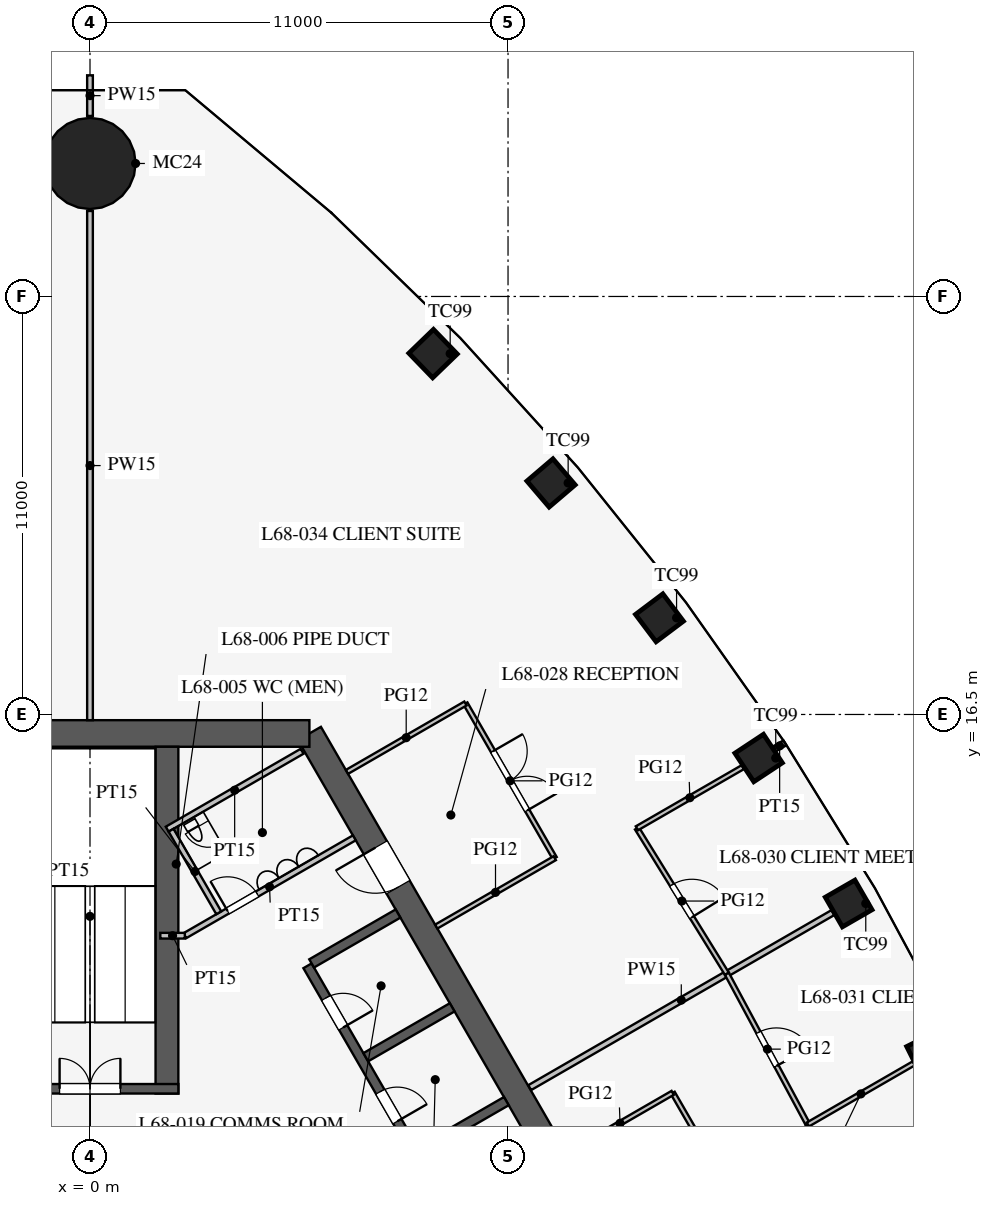
"""IFC4 building model, lengths in metres.
Left out: names, types, materials, properties, quantities, classifications, styles, units other than length and angle.
Written with IfcOpenShell. Run it as: python <this file> out.ifc"""

import sys

from ifc_helpers import new_model, si_unit, direction, frame, frame_2d, origin, origin_2d, place, context, subcontext, project, spatial, rectangle, circle, extrude, element, fill, save


model = new_model("IFC4")
c1 = context("Model", 3, precision=1e-05, world=origin(), true_north=direction((0.0, 1.0)))
c2 = subcontext(c1, "Body", "Model", "MODEL_VIEW")
j1 = project(units=[si_unit("LENGTHUNIT", "METRE"), si_unit("PLANEANGLEUNIT", "RADIAN")], contexts=[c1])
p1 = place(None, origin())
s1 = spatial("IfcSite", under=j1, at=p1, CompositionType="ELEMENT")
p2 = place(p1, origin())
s2 = spatial("IfcBuilding", under=s1, at=p2, CompositionType="ELEMENT")
p3 = place(p2, frame((0.0, 0.0, 297.3)))
s3 = spatial("IfcBuildingStorey", under=s2, at=p3, CompositionType="ELEMENT", Elevation=297.3)
for number, where, z_axis, x_axis in (
    (1, (22.094, 7.56, 0.0), (0.0, 0.0, 1.0), (-0.447, 0.895, 0.0)),
    (2, (19.963, 11.526, 0.0), (0.0, 0.0, 1.0), (-0.5, 0.866, 0.0)),
    (3, (17.594, 15.354, 0.0), (0.0, 0.0, 1.0), (-0.552, 0.834, 0.0)),
    (4, (14.985, 19.044, 0.0), (0.0, 0.0, 1.0), (-0.601, 0.799, 0.0)),
    (5, (12.132, 22.593, 0.0), (0.0, 0.0, 1.0), (-0.649, 0.761, 0.0)),
    (6, (9.027, 25.997, 0.0), (0.0, 0.0, 1.0), (-0.695, 0.719, 0.0)),
):
    element("IfcColumn", number, at=place(p3, frame(where, z_axis=z_axis, x_axis=x_axis)), inside=s3, PredefinedType="COLUMN", context=c2, shape_type="SweptSolid", body=[
        extrude(rectangle(XDim=0.9, YDim=0.9, at=origin_2d()), origin(), (0.0, 0.0, 1.0), 4.2),
    ])
p4 = place(p3, frame((0.0, 31.0, 0.0), z_axis=(0.0, 0.0, 1.0), x_axis=(1.0, 0.0, 0.0)))
e7 = element("IfcColumn", 7, at=p4, inside=s3, PredefinedType="COLUMN", context=c2, shape_type="SweptSolid", body=[
    extrude(circle(Radius=1.2, at=origin_2d()), origin(), (0.0, 0.0, 1.0), 4.2),
])
p5 = place(p3, frame((16.743, -3.0, 0.0), z_axis=(0.0, 0.0, 1.0), x_axis=(-0.500002442456, 0.866023993627, 0.0)))
e8 = element("IfcWall", 8, at=p5, inside=s3, PredefinedType="SHEAR", context=c2, shape_type="SweptSolid", body=[
    extrude(rectangle(XDim=21.939, YDim=0.7, at=frame_2d((10.97, 0.0))), origin(), (0.0, 0.0, 1.0), 4.2),
])
p6 = place(p5, frame((17.27, 0.0, 0.0)))
e9 = element("IfcOpeningElement", 9, at=p6, cuts=e8, PredefinedType="OPENING", context=c2, shape_type="SweptSolid", body=[
    extrude(rectangle(XDim=1.2, YDim=2.1, at=frame_2d((0.6, 1.05))), frame((0.0, 0.36, 0.0), z_axis=(0.0, -1.0, 0.0), x_axis=(1.0, 0.0, 0.0)), (0.0, 0.0, 1.0), 0.72),
])
p7 = place(p5, frame((3.47, 0.0, 0.0)))
e10 = element("IfcOpeningElement", 10, at=p7, cuts=e8, PredefinedType="OPENING", context=c2, shape_type="SweptSolid", body=[
    extrude(rectangle(XDim=1.2, YDim=2.1, at=frame_2d((0.6, 1.05))), frame((0.0, 0.36, 0.0), z_axis=(0.0, -1.0, 0.0), x_axis=(1.0, 0.0, 0.0)), (0.0, 0.0, 1.0), 0.72),
])
p8 = place(p3, frame((5.773, 16.0, 0.0), z_axis=(0.0, 0.0, 1.0), x_axis=(-1.0, 0.0, 0.0)))
e11 = element("IfcWall", 11, at=p8, inside=s3, PredefinedType="SHEAR", context=c2, shape_type="SweptSolid", body=[
    extrude(rectangle(XDim=11.547, YDim=0.7, at=frame_2d((5.773, 0.0))), origin(), (0.0, 0.0, 1.0), 4.2),
])
p9 = place(p3, frame((11.424, 0.014, 0.0), z_axis=(0.0, 0.0, 1.0), x_axis=(-0.500001763848, 0.866024385424, 0.0)))
e12 = element("IfcWall", 12, at=p9, inside=s3, PredefinedType="SHEAR", context=c2, shape_type="SweptSolid", body=[
    extrude(rectangle(XDim=11.4, YDim=0.25, at=frame_2d((5.7, 0.0))), origin(), (0.0, 0.0, 1.0), 4.2),
])
p10 = place(p9, frame((0.975, 0.0, 0.0)))
e13 = element("IfcOpeningElement", 13, at=p10, cuts=e12, PredefinedType="OPENING", context=c2, shape_type="SweptSolid", body=[
    extrude(rectangle(XDim=0.9, YDim=2.1, at=frame_2d((0.45, 1.05))), frame((0.0, 0.135, 0.0), z_axis=(0.0, -1.0, 0.0), x_axis=(1.0, 0.0, 0.0)), (0.0, 0.0, 1.0), 0.27),
])
p11 = place(p9, frame((3.825, 0.0, 0.0)))
e14 = element("IfcOpeningElement", 14, at=p11, cuts=e12, PredefinedType="OPENING", context=c2, shape_type="SweptSolid", body=[
    extrude(rectangle(XDim=0.9, YDim=2.1, at=frame_2d((0.45, 1.05))), frame((0.0, 0.135, 0.0), z_axis=(0.0, -1.0, 0.0), x_axis=(1.0, 0.0, 0.0)), (0.0, 0.0, 1.0), 0.27),
])
p12 = place(p9, frame((6.675, 0.0, 0.0)))
e15 = element("IfcOpeningElement", 15, at=p12, cuts=e12, PredefinedType="OPENING", context=c2, shape_type="SweptSolid", body=[
    extrude(rectangle(XDim=0.9, YDim=2.1, at=frame_2d((0.45, 1.05))), frame((0.0, 0.135, 0.0), z_axis=(0.0, -1.0, 0.0), x_axis=(1.0, 0.0, 0.0)), (0.0, 0.0, 1.0), 0.27),
])
p13 = place(p9, frame((9.525, 0.0, 0.0)))
e16 = element("IfcOpeningElement", 16, at=p13, cuts=e12, PredefinedType="OPENING", context=c2, shape_type="SweptSolid", body=[
    extrude(rectangle(XDim=0.9, YDim=2.1, at=frame_2d((0.45, 1.05))), frame((0.0, 0.135, 0.0), z_axis=(0.0, -1.0, 0.0), x_axis=(1.0, 0.0, 0.0)), (0.0, 0.0, 1.0), 0.27),
])
for number, where, z_axis, x_axis in (
    (17, (8.682, 5.012, 0.0), (0.0, 0.0, 1.0), (0.866, 0.5, 0.0)),
    (18, (7.257, 7.481, 0.0), (0.0, 0.0, 1.0), (0.866, 0.5, 0.0)),
    (19, (5.832, 9.949, 0.0), (0.0, 0.0, 1.0), (0.866, 0.5, 0.0)),
):
    element("IfcWall", number, at=place(p3, frame(where, z_axis=z_axis, x_axis=x_axis)), inside=s3, PredefinedType="SHEAR", context=c2, shape_type="SweptSolid", body=[
        extrude(rectangle(XDim=2.625, YDim=0.25, at=frame_2d((1.312, 0.0))), origin(), (0.0, 0.0, 1.0), 4.2),
    ])
p14 = place(p3, frame((2.025, 6.525, 0.0), z_axis=(0.0, 0.0, 1.0), x_axis=(0.0, 1.0, 0.0)))
e20 = element("IfcWall", 20, at=p14, inside=s3, PredefinedType="SHEAR", context=c2, shape_type="SweptSolid", body=[
    extrude(rectangle(XDim=9.125, YDim=0.6, at=frame_2d((4.562, 0.0))), origin(), (0.0, 0.0, 1.0), 4.2),
])
p15 = place(p3, frame((2.325, 6.65, 0.0), z_axis=(0.0, 0.0, 1.0), x_axis=(-1.0, 0.0, 0.0)))
e21 = element("IfcWall", 21, at=p15, inside=s3, PredefinedType="SHEAR", context=c2, shape_type="SweptSolid", body=[
    extrude(rectangle(XDim=4.65, YDim=0.25, at=frame_2d((2.325, 0.0))), origin(), (0.0, 0.0, 1.0), 4.2),
])
p16 = place(p15, frame((1.525, 0.0, 0.0)))
e22 = element("IfcOpeningElement", 22, at=p16, cuts=e21, PredefinedType="OPENING", context=c2, shape_type="SweptSolid", body=[
    extrude(rectangle(XDim=1.6, YDim=2.1, at=frame_2d((0.8, 1.05))), frame((0.0, 0.135, 0.0), z_axis=(0.0, -1.0, 0.0), x_axis=(1.0, 0.0, 0.0)), (0.0, 0.0, 1.0), 0.27),
])
p17 = place(p3, frame((2.495, 10.678, 0.0), z_axis=(0.0, 0.0, 1.0), x_axis=(0.866037967349, 0.499978238636, 0.0)))
e23 = element("IfcWall", 23, at=p17, inside=s3, PredefinedType="PARTITIONING", context=c2, shape_type="SweptSolid", body=[
    extrude(rectangle(XDim=5.15, YDim=0.15, at=frame_2d((2.575, 0.0))), origin(), (0.0, 0.0, 1.0), 4.0),
])
p18 = place(p17, frame((1.3, 0.0, 0.0)))
e24 = element("IfcOpeningElement", 24, at=p18, cuts=e23, PredefinedType="OPENING", context=c2, shape_type="SweptSolid", body=[
    extrude(rectangle(XDim=0.9, YDim=2.1, at=frame_2d((0.45, 1.05))), frame((0.0, 0.085, 0.0), z_axis=(0.0, -1.0, 0.0), x_axis=(1.0, 0.0, 0.0)), (0.0, 0.0, 1.0), 0.17),
])
p19 = place(p3, frame((2.495, 10.678, 0.0), z_axis=(0.0, 0.0, 1.0), x_axis=(-1.0, 0.0, 0.0)))
e25 = element("IfcWall", 25, at=p19, inside=s3, PredefinedType="PARTITIONING", context=c2, shape_type="SweptSolid", body=[
    extrude(rectangle(XDim=0.645, YDim=0.15, at=frame_2d((0.323, 0.0))), origin(), (0.0, 0.0, 1.0), 4.0),
])
p20 = place(p3, frame((2.031, 13.482, 0.0), z_axis=(0.0, 0.0, 1.0), x_axis=(0.866050731258, 0.499956128963, 0.0)))
e26 = element("IfcWall", 26, at=p20, inside=s3, PredefinedType="PARTITIONING", context=c2, shape_type="SweptSolid", body=[
    extrude(rectangle(XDim=4.1, YDim=0.15, at=frame_2d((2.05, 0.0))), origin(), (0.0, 0.0, 1.0), 4.0),
])
p21 = place(p3, frame((3.389, 11.281, 0.0), z_axis=(0.0, 0.0, 1.0), x_axis=(-0.499989096993, 0.866031698547, 0.0)))
e27 = element("IfcWall", 27, at=p21, inside=s3, PredefinedType="PARTITIONING", context=c2, shape_type="SweptSolid", body=[
    extrude(rectangle(XDim=2.51, YDim=0.15, at=frame_2d((1.255, 0.0))), origin(), (0.0, 0.0, 1.0), 4.0),
])
p22 = place(p3, frame((0.0, 16.35, 0.0), z_axis=(0.0, 0.0, 1.0), x_axis=(0.0, 1.0, 0.0)))
e28 = element("IfcWall", 28, at=p22, inside=s3, PredefinedType="PARTITIONING", context=c2, shape_type="SweptSolid", body=[
    extrude(rectangle(XDim=13.4, YDim=0.15, at=frame_2d((6.7, 0.0))), origin(), (0.0, 0.0, 1.0), 2.5),
])
p23 = place(p3, frame((0.0, 32.25, 0.0), z_axis=(0.0, 0.0, 1.0), x_axis=(0.0, 1.0, 0.0)))
e29 = element("IfcWall", 29, at=p23, inside=s3, PredefinedType="PARTITIONING", context=c2, shape_type="SweptSolid", body=[
    extrude(rectangle(XDim=1.07, YDim=0.15, at=frame_2d((0.535, 0.0))), origin(), (0.0, 0.0, 1.0), 2.5),
])
p24 = place(p3, frame((11.57, 6.68, 0.0), z_axis=(0.0, 0.0, 1.0), x_axis=(0.866019635725, 0.500009990439, 0.0)))
e30 = element("IfcWall", 30, at=p24, inside=s3, PredefinedType="PARTITIONING", context=c2, shape_type="SweptSolid", body=[
    extrude(rectangle(XDim=9.212, YDim=0.15, at=frame_2d((4.606, 0.0))), origin(), (0.0, 0.0, 1.0), 3.3),
])
p25 = place(p3, frame((12.229, 12.719, 0.0), z_axis=(0.0, 0.0, 1.0), x_axis=(-0.500016218704, 0.866016039709, 0.0)))
e31 = element("IfcWall", 31, at=p25, inside=s3, PredefinedType="PARTITIONING", context=c2, shape_type="SweptSolid", body=[
    extrude(rectangle(XDim=4.7, YDim=0.12, at=frame_2d((2.35, 0.0))), origin(), (0.0, 0.0, 1.0), 2.9),
])
p26 = place(p25, frame((1.45, 0.0, 0.15)))
e32 = element("IfcOpeningElement", 32, at=p26, cuts=e31, PredefinedType="OPENING", context=c2, shape_type="SweptSolid", body=[
    extrude(rectangle(XDim=1.8, YDim=2.1, at=frame_2d((0.9, 1.05))), frame((0.0, 0.07, 0.0), z_axis=(0.0, -1.0, 0.0), x_axis=(1.0, 0.0, 0.0)), (0.0, 0.0, 1.0), 0.14),
])
p27 = place(p3, frame((17.133, 3.425, 0.0), z_axis=(0.0, 0.0, 1.0), x_axis=(-0.500012057535, 0.866018442252, 0.0)))
e33 = element("IfcWall", 33, at=p27, inside=s3, PredefinedType="PARTITIONING", context=c2, shape_type="SweptSolid", body=[
    extrude(rectangle(XDim=3.6, YDim=0.12, at=frame_2d((1.8, 0.0))), origin(), (0.0, 0.0, 1.0), 2.9),
])
p28 = place(p27, frame((1.3, 0.0, 0.15)))
e34 = element("IfcOpeningElement", 34, at=p28, cuts=e33, PredefinedType="OPENING", context=c2, shape_type="SweptSolid", body=[
    extrude(rectangle(XDim=1.0, YDim=2.1, at=frame_2d((0.5, 1.05))), frame((0.0, 0.07, 0.0), z_axis=(0.0, -1.0, 0.0), x_axis=(1.0, 0.0, 0.0)), (0.0, 0.0, 1.0), 0.14),
])
p29 = place(p3, frame((9.111, 10.918, 0.0), z_axis=(0.0, 0.0, 1.0), x_axis=(0.866035395735, 0.499982693035, 0.0)))
e35 = element("IfcWall", 35, at=p29, inside=s3, PredefinedType="PARTITIONING", context=c2, shape_type="SweptSolid", body=[
    extrude(rectangle(XDim=3.6, YDim=0.12, at=frame_2d((1.8, 0.0))), origin(), (0.0, 0.0, 1.0), 2.9),
])
p30 = place(p3, frame((6.761, 14.989, 0.0), z_axis=(0.0, 0.0, 1.0), x_axis=(0.866018442252, 0.500012057535, 0.0)))
e36 = element("IfcWall", 36, at=p30, inside=s3, PredefinedType="PARTITIONING", context=c2, shape_type="SweptSolid", body=[
    extrude(rectangle(XDim=3.6, YDim=0.12, at=frame_2d((1.8, 0.0))), origin(), (0.0, 0.0, 1.0), 2.9),
])
p31 = place(p3, frame((12.562, 4.943, 0.0), z_axis=(0.0, 0.0, 1.0), x_axis=(0.866008981251, 0.500028443584, 0.0)))
e37 = element("IfcWall", 37, at=p31, inside=s3, PredefinedType="PARTITIONING", context=c2, shape_type="SweptSolid", body=[
    extrude(rectangle(XDim=3.2, YDim=0.12, at=frame_2d((1.6, 0.0))), origin(), (0.0, 0.0, 1.0), 2.9),
])
p32 = place(p3, frame((18.01, 15.594, 0.0), z_axis=(0.0, 0.0, 1.0), x_axis=(0.866095534226, 0.499878510834, 0.0)))
e38 = element("IfcWall", 38, at=p32, inside=s3, PredefinedType="PARTITIONING", context=c2, shape_type="SweptSolid", body=[
    extrude(rectangle(XDim=0.316, YDim=0.15, at=frame_2d((0.158, 0.0))), origin(), (0.0, 0.0, 1.0), 2.9),
])
p33 = place(p3, frame((16.759, 9.676, 0.0), z_axis=(0.0, 0.0, 1.0), x_axis=(-0.525996140194, 0.850486954927, 0.0)))
e39 = element("IfcWall", 39, at=p33, inside=s3, PredefinedType="PARTITIONING", context=c2, shape_type="SweptSolid", body=[
    extrude(rectangle(XDim=4.502, YDim=0.12, at=frame_2d((2.251, 0.0))), origin(), (0.0, 0.0, 1.0), 2.9),
])
p34 = place(p33, frame((1.75, 0.0, 0.15)))
e40 = element("IfcOpeningElement", 40, at=p34, cuts=e39, PredefinedType="OPENING", context=c2, shape_type="SweptSolid", body=[
    extrude(rectangle(XDim=1.0, YDim=2.1, at=frame_2d((0.5, 1.05))), frame((0.0, 0.07, 0.0), z_axis=(0.0, -1.0, 0.0), x_axis=(1.0, 0.0, 0.0)), (0.0, 0.0, 1.0), 0.14),
])
p35 = place(p3, frame((18.891, 5.71, 0.0), z_axis=(0.0, 0.0, 1.0), x_axis=(-0.473524102582, 0.880780860529, 0.0)))
e41 = element("IfcWall", 41, at=p35, inside=s3, PredefinedType="PARTITIONING", context=c2, shape_type="SweptSolid", body=[
    extrude(rectangle(XDim=4.502, YDim=0.12, at=frame_2d((2.251, 0.0))), origin(), (0.0, 0.0, 1.0), 2.9),
])
p36 = place(p35, frame((1.75, 0.0, 0.15)))
e42 = element("IfcOpeningElement", 42, at=p36, cuts=e41, PredefinedType="OPENING", context=c2, shape_type="SweptSolid", body=[
    extrude(rectangle(XDim=1.0, YDim=2.1, at=frame_2d((0.5, 1.05))), frame((0.0, 0.07, 0.0), z_axis=(0.0, -1.0, 0.0), x_axis=(1.0, 0.0, 0.0)), (0.0, 0.0, 1.0), 0.14),
])
p37 = place(p3, frame((20.786, 1.608, 0.0), z_axis=(0.0, 0.0, 1.0), x_axis=(-0.419335693458, 0.907831248742, 0.0)))
e43 = element("IfcWall", 43, at=p37, inside=s3, PredefinedType="PARTITIONING", context=c2, shape_type="SweptSolid", body=[
    extrude(rectangle(XDim=4.519, YDim=0.12, at=frame_2d((2.259, 0.0))), origin(), (0.0, 0.0, 1.0), 2.9),
])
p38 = place(p37, frame((1.75, 0.0, 0.15)))
e44 = element("IfcOpeningElement", 44, at=p38, cuts=e43, PredefinedType="OPENING", context=c2, shape_type="SweptSolid", body=[
    extrude(rectangle(XDim=1.0, YDim=2.1, at=frame_2d((0.5, 1.05))), frame((0.0, 0.07, 0.0), z_axis=(0.0, -1.0, 0.0), x_axis=(1.0, 0.0, 0.0)), (0.0, 0.0, 1.0), 0.14),
])
p39 = place(p3, frame((14.391, 13.505, 0.0), z_axis=(0.0, 0.0, 1.0), x_axis=(0.866054182849, 0.499950149885, 0.0)))
e45 = element("IfcWall", 45, at=p39, inside=s3, PredefinedType="PARTITIONING", context=c2, shape_type="SweptSolid", body=[
    extrude(rectangle(XDim=3.218, YDim=0.12, at=frame_2d((1.609, 0.0))), origin(), (0.0, 0.0, 1.0), 2.9),
])
p40 = place(p3, frame((18.891, 5.71, 0.0), z_axis=(0.0, 0.0, 1.0), x_axis=(0.866021328928, 0.500007057792, 0.0)))
e46 = element("IfcWall", 46, at=p40, inside=s3, PredefinedType="PARTITIONING", context=c2, shape_type="SweptSolid", body=[
    extrude(rectangle(XDim=3.218, YDim=0.12, at=frame_2d((1.609, 0.0))), origin(), (0.0, 0.0, 1.0), 2.9),
])
p41 = place(p18, origin())
e47 = element("IfcDoor", 47, at=p41, inside=s3, OperationType="SINGLE_SWING_LEFT", PredefinedType="DOOR", context=c2, shape_type="SweptSolid", body=[
    extrude(rectangle(XDim=0.9, YDim=2.1, at=frame_2d((0.45, 1.05))), frame((0.0, 0.025, 0.0), z_axis=(0.0, -1.0, 0.0), x_axis=(1.0, 0.0, 0.0)), (0.0, 0.0, 1.0), 0.05),
])
fill(e24, e47)
p42 = place(p16, frame((1.6, 0.0, 0.0), z_axis=(0.0, 0.0, 1.0), x_axis=(-1.0, 0.0, 0.0)))
e48 = element("IfcDoor", 48, at=p42, inside=s3, OperationType="DOUBLE_DOOR_SINGLE_SWING", PredefinedType="DOOR", context=c2, shape_type="SweptSolid", body=[
    extrude(rectangle(XDim=1.6, YDim=2.1, at=frame_2d((0.8, 1.05))), frame((0.0, 0.025, 0.0), z_axis=(0.0, -1.0, 0.0), x_axis=(1.0, 0.0, 0.0)), (0.0, 0.0, 1.0), 0.05),
])
fill(e22, e48)
p43 = place(p6, origin())
e49 = element("IfcDoor", 49, at=p43, inside=s3, OperationType="SINGLE_SWING_RIGHT", PredefinedType="DOOR", context=c2, shape_type="SweptSolid", body=[
    extrude(rectangle(XDim=1.2, YDim=2.1, at=frame_2d((0.6, 1.05))), frame((0.0, 0.025, 0.0), z_axis=(0.0, -1.0, 0.0), x_axis=(1.0, 0.0, 0.0)), (0.0, 0.0, 1.0), 0.05),
])
fill(e9, e49)
p44 = place(p12, frame((0.9, 0.0, 0.0), z_axis=(0.0, 0.0, 1.0), x_axis=(-1.0, 0.0, 0.0)))
e50 = element("IfcDoor", 50, at=p44, inside=s3, OperationType="SINGLE_SWING_RIGHT", PredefinedType="DOOR", context=c2, shape_type="SweptSolid", body=[
    extrude(rectangle(XDim=0.9, YDim=2.1, at=frame_2d((0.45, 1.05))), frame((0.0, 0.025, 0.0), z_axis=(0.0, -1.0, 0.0), x_axis=(1.0, 0.0, 0.0)), (0.0, 0.0, 1.0), 0.05),
])
fill(e15, e50)
p45 = place(p13, frame((0.9, 0.0, 0.0), z_axis=(0.0, 0.0, 1.0), x_axis=(-1.0, 0.0, 0.0)))
e51 = element("IfcDoor", 51, at=p45, inside=s3, OperationType="SINGLE_SWING_RIGHT", PredefinedType="DOOR", context=c2, shape_type="SweptSolid", body=[
    extrude(rectangle(XDim=0.9, YDim=2.1, at=frame_2d((0.45, 1.05))), frame((0.0, 0.025, 0.0), z_axis=(0.0, -1.0, 0.0), x_axis=(1.0, 0.0, 0.0)), (0.0, 0.0, 1.0), 0.05),
])
fill(e16, e51)
p46 = place(p26, frame((1.8, 0.0, 0.0), z_axis=(0.0, 0.0, 1.0), x_axis=(-1.0, 0.0, 0.0)))
e52 = element("IfcDoor", 52, at=p46, inside=s3, OperationType="DOUBLE_DOOR_SINGLE_SWING", PredefinedType="DOOR", context=c2, shape_type="SweptSolid", body=[
    extrude(rectangle(XDim=1.8, YDim=2.1, at=frame_2d((0.9, 1.05))), frame((0.0, 0.025, 0.0), z_axis=(0.0, -1.0, 0.0), x_axis=(1.0, 0.0, 0.0)), (0.0, 0.0, 1.0), 0.05),
])
fill(e32, e52)
p47 = place(p34, frame((1.0, 0.0, 0.0), z_axis=(0.0, 0.0, 1.0), x_axis=(-1.0, 0.0, 0.0)))
e53 = element("IfcDoor", 53, at=p47, inside=s3, OperationType="SINGLE_SWING_RIGHT", PredefinedType="DOOR", context=c2, shape_type="SweptSolid", body=[
    extrude(rectangle(XDim=1.0, YDim=2.1, at=frame_2d((0.5, 1.05))), frame((0.0, 0.025, 0.0), z_axis=(0.0, -1.0, 0.0), x_axis=(1.0, 0.0, 0.0)), (0.0, 0.0, 1.0), 0.05),
])
fill(e40, e53)
p48 = place(p36, frame((1.0, 0.0, 0.0), z_axis=(0.0, 0.0, 1.0), x_axis=(-1.0, 0.0, 0.0)))
e54 = element("IfcDoor", 54, at=p48, inside=s3, OperationType="SINGLE_SWING_RIGHT", PredefinedType="DOOR", context=c2, shape_type="SweptSolid", body=[
    extrude(rectangle(XDim=1.0, YDim=2.1, at=frame_2d((0.5, 1.05))), frame((0.0, 0.025, 0.0), z_axis=(0.0, -1.0, 0.0), x_axis=(1.0, 0.0, 0.0)), (0.0, 0.0, 1.0), 0.05),
])
fill(e42, e54)
save(model, sys.argv[1])
